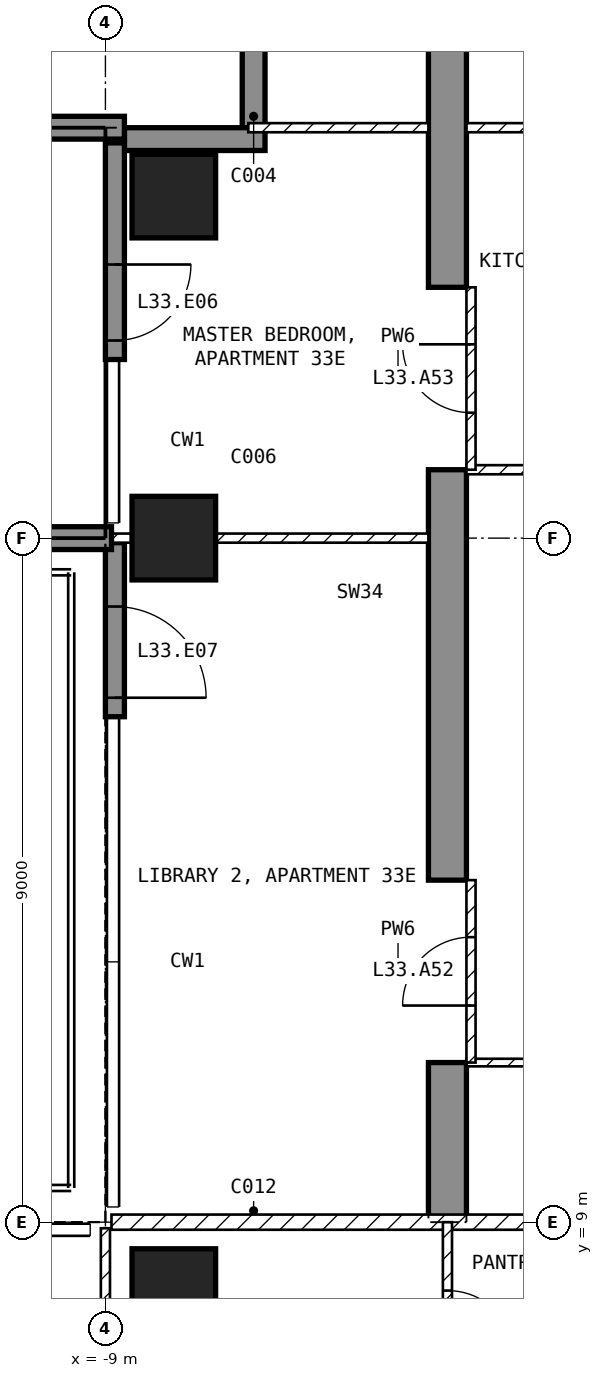
"""IFC4 building model, lengths in metres.
Left out: names, types, materials, properties, quantities, classifications, styles, units other than length and angle.
Written with IfcOpenShell. Run it as: python <this file> out.ifc"""

import sys

from ifc_helpers import new_model, si_unit, direction, frame, frame_2d, origin, origin_2d, place, context, subcontext, project, spatial, polyline, rectangle, outline, extrude, element, fill, save


model = new_model("IFC4")
c1 = context("Model", 3, precision=1e-05, world=origin(), true_north=direction((0.0, 1.0)))
c2 = subcontext(c1, "Body", "Model", "MODEL_VIEW")
j1 = project(units=[si_unit("LENGTHUNIT", "METRE"), si_unit("PLANEANGLEUNIT", "RADIAN")], contexts=[c1])
p1 = place(None, origin())
s1 = spatial("IfcSite", under=j1, at=p1, CompositionType="ELEMENT")
p2 = place(p1, origin())
s2 = spatial("IfcBuilding", under=s1, at=p2, CompositionType="ELEMENT")
p3 = place(p2, frame((0.0, 0.0, 137.4)))
s3 = spatial("IfcBuildingStorey", under=s2, at=p3, CompositionType="ELEMENT", Elevation=137.4)
for number, where, z_axis, x_axis in (
    (1, (-8.1, 8.1, -0.25), (0.0, 0.0, 1.0), (1.0, 0.0, 0.0)),
    (2, (-8.1, 18.0, -0.25), (0.0, 0.0, 1.0), (1.0, 0.0, 0.0)),
    (3, (-8.1, 22.5, -0.25), (0.0, 0.0, 1.0), (1.0, 0.0, 0.0)),
):
    element("IfcColumn", number, at=place(p3, frame(where, z_axis=z_axis, x_axis=x_axis)), inside=s3, PredefinedType="COLUMN", context=c2, shape_type="SweptSolid", body=[
        extrude(rectangle(XDim=1.1, YDim=1.1, at=origin_2d()), origin(), (0.0, 0.0, 1.0), 3.5),
    ])
p4 = place(p3, frame((-4.75, 9.0, -0.25), z_axis=(1.0, 0.0, 0.0), x_axis=(0.0, 1.0, 0.0)))
e4 = element("IfcWall", 4, at=p4, inside=s3, PredefinedType="SHEAR", context=c2, shape_type="SweptSolid", body=[
    extrude(outline(polyline([(0.0, 0.0), (2.1, 0.0), (2.1, 2.65), (4.5, 2.65), (4.5, 0.0), (9.9, 0.0), (9.9, 2.65), (12.3, 2.65), (12.3, 0.0), (16.55, 0.0), (16.55, 3.5), (0.0, 3.5), (0.0, 0.0)])), origin(), (0.0, 0.0, 1.0), 0.5),
])
p5 = place(p3, frame((-8.875, 23.2, 0.0), z_axis=(0.0, 0.0, 1.0), x_axis=(0.0, -1.0, 0.0)))
e5 = element("IfcWall", 5, at=p5, inside=s3, PredefinedType="SOLIDWALL", context=c2, shape_type="SweptSolid", body=[
    extrude(rectangle(XDim=2.85, YDim=0.25, at=frame_2d((1.425, 0.0))), origin(), (0.0, 0.0, 1.0), 3.25),
])
p6 = place(p5, frame((1.6, 0.0, 0.0)))
e6 = element("IfcOpeningElement", 6, at=p6, cuts=e5, PredefinedType="OPENING", context=c2, shape_type="SweptSolid", body=[
    extrude(rectangle(XDim=1.0, YDim=2.4, at=frame_2d((0.5, 1.2))), frame((0.0, 0.135, 0.0), z_axis=(0.0, -1.0, 0.0), x_axis=(1.0, 0.0, 0.0)), (0.0, 0.0, 1.0), 0.27),
])
p7 = place(p3, frame((-8.875, 17.94, 0.0), z_axis=(0.0, 0.0, 1.0), x_axis=(0.0, -1.0, 0.0)))
e7 = element("IfcWall", 7, at=p7, inside=s3, PredefinedType="SOLIDWALL", context=c2, shape_type="SweptSolid", body=[
    extrude(rectangle(XDim=2.29, YDim=0.25, at=frame_2d((1.145, 0.0))), origin(), (0.0, 0.0, 1.0), 3.25),
])
p8 = place(p7, frame((0.84, 0.0, 0.0)))
e8 = element("IfcOpeningElement", 8, at=p8, cuts=e7, PredefinedType="OPENING", context=c2, shape_type="SweptSolid", body=[
    extrude(rectangle(XDim=1.2, YDim=2.4, at=frame_2d((0.6, 1.2))), frame((0.0, 0.135, 0.0), z_axis=(0.0, -1.0, 0.0), x_axis=(1.0, 0.0, 0.0)), (0.0, 0.0, 1.0), 0.27),
])
p9 = place(p3, frame((-7.05, 25.2, 0.0), z_axis=(0.0, 0.0, 1.0), x_axis=(0.0, -1.0, 0.0)))
e9 = element("IfcWall", 9, at=p9, inside=s3, PredefinedType="SOLIDWALL", context=c2, shape_type="SweptSolid", body=[
    extrude(rectangle(XDim=1.8, YDim=0.3, at=frame_2d((0.9, 0.0))), origin(), (0.0, 0.0, 1.0), 3.25),
])
p10 = place(p3, frame((-6.9, 23.25, 0.0), z_axis=(0.0, 0.0, 1.0), x_axis=(-1.0, 0.0, 0.0)))
e10 = element("IfcWall", 10, at=p10, inside=s3, PredefinedType="SOLIDWALL", context=c2, shape_type="SweptSolid", body=[
    extrude(rectangle(XDim=1.85, YDim=0.3, at=frame_2d((0.925, 0.0))), origin(), (0.0, 0.0, 1.0), 3.25),
])
p11 = place(p3, frame((-8.92, 18.0, 0.0), z_axis=(0.0, 0.0, 1.0), x_axis=(-1.0, 0.0, 0.0)))
e11 = element("IfcWall", 11, at=p11, inside=s3, PredefinedType="SOLIDWALL", context=c2, shape_type="SweptSolid", body=[
    extrude(rectangle(XDim=2.82, YDim=0.3, at=frame_2d((1.41, 0.0))), origin(), (0.0, 0.0, 1.0), 3.25),
])
p12 = place(p3, frame((-8.75, 23.4, 0.0), z_axis=(0.0, 0.0, 1.0), x_axis=(-1.0, 0.0, 0.0)))
e12 = element("IfcWall", 12, at=p12, inside=s3, PredefinedType="SOLIDWALL", context=c2, shape_type="SweptSolid", body=[
    extrude(rectangle(XDim=2.95, YDim=0.3, at=frame_2d((1.475, 0.0))), origin(), (0.0, 0.0, 1.0), 3.25),
])
p13 = place(p3, frame((-8.92, 9.0, 0.0), z_axis=(0.0, 0.0, 1.0), x_axis=(1.0, 0.0, 0.0)))
e13 = element("IfcWall", 13, at=p13, inside=s3, PredefinedType="PARTITIONING", context=c2, shape_type="SweptSolid", body=[
    extrude(rectangle(XDim=17.84, YDim=0.2, at=frame_2d((8.92, 0.0))), origin(), (0.0, 0.0, 1.0), 3.25),
])
p14 = place(p13, frame((8.42, 0.0, 0.0)))
e14 = element("IfcOpeningElement", 14, at=p14, cuts=e13, PredefinedType="OPENING", context=c2, shape_type="SweptSolid", body=[
    extrude(rectangle(XDim=1.0, YDim=2.1, at=frame_2d((0.5, 1.05))), frame((0.0, 0.11, 0.0), z_axis=(0.0, -1.0, 0.0), x_axis=(1.0, 0.0, 0.0)), (0.0, 0.0, 1.0), 0.22),
])
p15 = place(p3, frame((-9.0, 8.92, 0.0), z_axis=(0.0, 0.0, 1.0), x_axis=(0.0, -1.0, 0.0)))
e15 = element("IfcWall", 15, at=p15, inside=s3, PredefinedType="PARTITIONING", context=c2, shape_type="SweptSolid", body=[
    extrude(rectangle(XDim=7.62, YDim=0.12, at=frame_2d((3.81, 0.0))), origin(), (0.0, 0.0, 1.0), 3.25),
])
p16 = place(p15, frame((5.57, 0.0, 0.0)))
e16 = element("IfcOpeningElement", 16, at=p16, cuts=e15, PredefinedType="OPENING", context=c2, shape_type="SweptSolid", body=[
    extrude(rectangle(XDim=0.9, YDim=2.1, at=frame_2d((0.45, 1.05))), frame((0.0, 0.07, 0.0), z_axis=(0.0, -1.0, 0.0), x_axis=(1.0, 0.0, 0.0)), (0.0, 0.0, 1.0), 0.14),
])
p17 = place(p3, frame((-4.5, 9.0, 0.0), z_axis=(0.0, 0.0, 1.0), x_axis=(0.0, -1.0, 0.0)))
e17 = element("IfcWall", 17, at=p17, inside=s3, PredefinedType="PARTITIONING", context=c2, shape_type="SweptSolid", body=[
    extrude(rectangle(XDim=2.7, YDim=0.12, at=frame_2d((1.35, 0.0))), origin(), (0.0, 0.0, 1.0), 3.25),
])
p18 = place(p17, frame((0.9, 0.0, 0.0)))
e18 = element("IfcOpeningElement", 18, at=p18, cuts=e17, PredefinedType="OPENING", context=c2, shape_type="SweptSolid", body=[
    extrude(rectangle(XDim=0.9, YDim=2.1, at=frame_2d((0.45, 1.05))), frame((0.0, 0.07, 0.0), z_axis=(0.0, -1.0, 0.0), x_axis=(1.0, 0.0, 0.0)), (0.0, 0.0, 1.0), 0.14),
])
p19 = place(p3, frame((-4.25, 11.1, 0.0), z_axis=(0.0, 0.0, 1.0), x_axis=(1.0, 0.0, 0.0)))
e19 = element("IfcWall", 19, at=p19, inside=s3, PredefinedType="PARTITIONING", context=c2, shape_type="SweptSolid", body=[
    extrude(rectangle(XDim=2.15, YDim=0.1, at=frame_2d((1.075, 0.0))), origin(), (0.0, 0.0, 1.0), 3.25),
])
p20 = place(p3, frame((-4.25, 18.9, 0.0), z_axis=(0.0, 0.0, 1.0), x_axis=(1.0, 0.0, 0.0)))
e20 = element("IfcWall", 20, at=p20, inside=s3, PredefinedType="PARTITIONING", context=c2, shape_type="SweptSolid", body=[
    extrude(rectangle(XDim=8.5, YDim=0.12, at=frame_2d((4.25, 0.0))), origin(), (0.0, 0.0, 1.0), 3.25),
])
p21 = place(p20, frame((5.675, 0.0, 0.0)))
e21 = element("IfcOpeningElement", 21, at=p21, cuts=e20, PredefinedType="OPENING", context=c2, shape_type="SweptSolid", body=[
    extrude(rectangle(XDim=0.9, YDim=2.1, at=frame_2d((0.45, 1.05))), frame((0.0, 0.07, 0.0), z_axis=(0.0, -1.0, 0.0), x_axis=(1.0, 0.0, 0.0)), (0.0, 0.0, 1.0), 0.14),
])
p22 = place(p3, frame((-4.25, 23.4, 0.0), z_axis=(0.0, 0.0, 1.0), x_axis=(1.0, 0.0, 0.0)))
e22 = element("IfcWall", 22, at=p22, inside=s3, PredefinedType="PARTITIONING", context=c2, shape_type="SweptSolid", body=[
    extrude(rectangle(XDim=8.5, YDim=0.12, at=frame_2d((4.25, 0.0))), origin(), (0.0, 0.0, 1.0), 3.25),
])
p23 = place(p22, frame((5.675, 0.0, 0.0)))
e23 = element("IfcOpeningElement", 23, at=p23, cuts=e22, PredefinedType="OPENING", context=c2, shape_type="SweptSolid", body=[
    extrude(rectangle(XDim=0.9, YDim=2.1, at=frame_2d((0.45, 1.05))), frame((0.0, 0.07, 0.0), z_axis=(0.0, -1.0, 0.0), x_axis=(1.0, 0.0, 0.0)), (0.0, 0.0, 1.0), 0.14),
])
p24 = place(p3, frame((-8.92, 18.0, 0.0), z_axis=(0.0, 0.0, 1.0), x_axis=(1.0, 0.0, 0.0)))
e24 = element("IfcWall", 24, at=p24, inside=s3, PredefinedType="PARTITIONING", context=c2, shape_type="SweptSolid", body=[
    extrude(rectangle(XDim=4.17, YDim=0.12, at=frame_2d((2.085, 0.0))), origin(), (0.0, 0.0, 1.0), 2.414),
])
p25 = place(p3, frame((-7.12, 23.4, 0.0), z_axis=(0.0, 0.0, 1.0), x_axis=(1.0, 0.0, 0.0)))
e25 = element("IfcWall", 25, at=p25, inside=s3, PredefinedType="PARTITIONING", context=c2, shape_type="SweptSolid", body=[
    extrude(rectangle(XDim=2.37, YDim=0.12, at=frame_2d((1.185, 0.0))), origin(), (0.0, 0.0, 1.0), 3.25),
])
p26 = place(p3, frame((-4.19, 11.1, 0.0), z_axis=(0.0, 0.0, 1.0), x_axis=(0.0, 1.0, 0.0)))
e26 = element("IfcWall", 26, at=p26, inside=s3, PredefinedType="PARTITIONING", context=c2, shape_type="SweptSolid", body=[
    extrude(rectangle(XDim=2.4, YDim=0.12, at=frame_2d((1.2, 0.0))), origin(), (0.0, 0.0, 1.0), 2.4),
])
p27 = place(p26, frame((0.75, 0.0, 0.0)))
e27 = element("IfcOpeningElement", 27, at=p27, cuts=e26, PredefinedType="OPENING", context=c2, shape_type="SweptSolid", body=[
    extrude(rectangle(XDim=0.9, YDim=2.1, at=frame_2d((0.45, 1.05))), frame((0.0, 0.07, 0.0), z_axis=(0.0, -1.0, 0.0), x_axis=(1.0, 0.0, 0.0)), (0.0, 0.0, 1.0), 0.14),
])
p28 = place(p3, frame((-4.19, 18.9, 0.0), z_axis=(0.0, 0.0, 1.0), x_axis=(0.0, 1.0, 0.0)))
e28 = element("IfcWall", 28, at=p28, inside=s3, PredefinedType="PARTITIONING", context=c2, shape_type="SweptSolid", body=[
    extrude(rectangle(XDim=2.4, YDim=0.12, at=frame_2d((1.2, 0.0))), origin(), (0.0, 0.0, 1.0), 2.4),
])
p29 = place(p28, frame((0.75, 0.0, 0.0)))
e29 = element("IfcOpeningElement", 29, at=p29, cuts=e28, PredefinedType="OPENING", context=c2, shape_type="SweptSolid", body=[
    extrude(rectangle(XDim=0.9, YDim=2.1, at=frame_2d((0.45, 1.05))), frame((0.0, 0.07, 0.0), z_axis=(0.0, -1.0, 0.0), x_axis=(1.0, 0.0, 0.0)), (0.0, 0.0, 1.0), 0.14),
])
p30 = place(p6, origin())
e30 = element("IfcDoor", 30, at=p30, inside=s3, OperationType="SINGLE_SWING_LEFT", PredefinedType="DOOR", context=c2, shape_type="SweptSolid", body=[
    extrude(rectangle(XDim=1.0, YDim=2.4, at=frame_2d((0.5, 1.2))), frame((0.0, 0.025, 0.0), z_axis=(0.0, -1.0, 0.0), x_axis=(1.0, 0.0, 0.0)), (0.0, 0.0, 1.0), 0.05),
])
fill(e6, e30)
p31 = place(p8, origin())
e31 = element("IfcDoor", 31, at=p31, inside=s3, OperationType="SINGLE_SWING_RIGHT", PredefinedType="DOOR", context=c2, shape_type="SweptSolid", body=[
    extrude(rectangle(XDim=1.2, YDim=2.4, at=frame_2d((0.6, 1.2))), frame((0.0, 0.025, 0.0), z_axis=(0.0, -1.0, 0.0), x_axis=(1.0, 0.0, 0.0)), (0.0, 0.0, 1.0), 0.05),
])
fill(e8, e31)
p32 = place(p18, origin())
e32 = element("IfcDoor", 32, at=p32, inside=s3, OperationType="SINGLE_SWING_RIGHT", PredefinedType="DOOR", context=c2, shape_type="SweptSolid", body=[
    extrude(rectangle(XDim=0.9, YDim=2.1, at=frame_2d((0.45, 1.05))), frame((0.0, 0.025, 0.0), z_axis=(0.0, -1.0, 0.0), x_axis=(1.0, 0.0, 0.0)), (0.0, 0.0, 1.0), 0.05),
])
fill(e18, e32)
p33 = place(p27, origin())
e33 = element("IfcDoor", 33, at=p33, inside=s3, OperationType="SINGLE_SWING_LEFT", PredefinedType="DOOR", context=c2, shape_type="SweptSolid", body=[
    extrude(rectangle(XDim=0.9, YDim=2.1, at=frame_2d((0.45, 1.05))), frame((0.0, 0.025, 0.0), z_axis=(0.0, -1.0, 0.0), x_axis=(1.0, 0.0, 0.0)), (0.0, 0.0, 1.0), 0.05),
])
fill(e27, e33)
p34 = place(p29, origin())
e34 = element("IfcDoor", 34, at=p34, inside=s3, OperationType="SINGLE_SWING_RIGHT", PredefinedType="DOOR", context=c2, shape_type="SweptSolid", body=[
    extrude(rectangle(XDim=0.9, YDim=2.1, at=frame_2d((0.45, 1.05))), frame((0.0, 0.025, 0.0), z_axis=(0.0, -1.0, 0.0), x_axis=(1.0, 0.0, 0.0)), (0.0, 0.0, 1.0), 0.05),
])
fill(e29, e34)
save(model, sys.argv[1])
